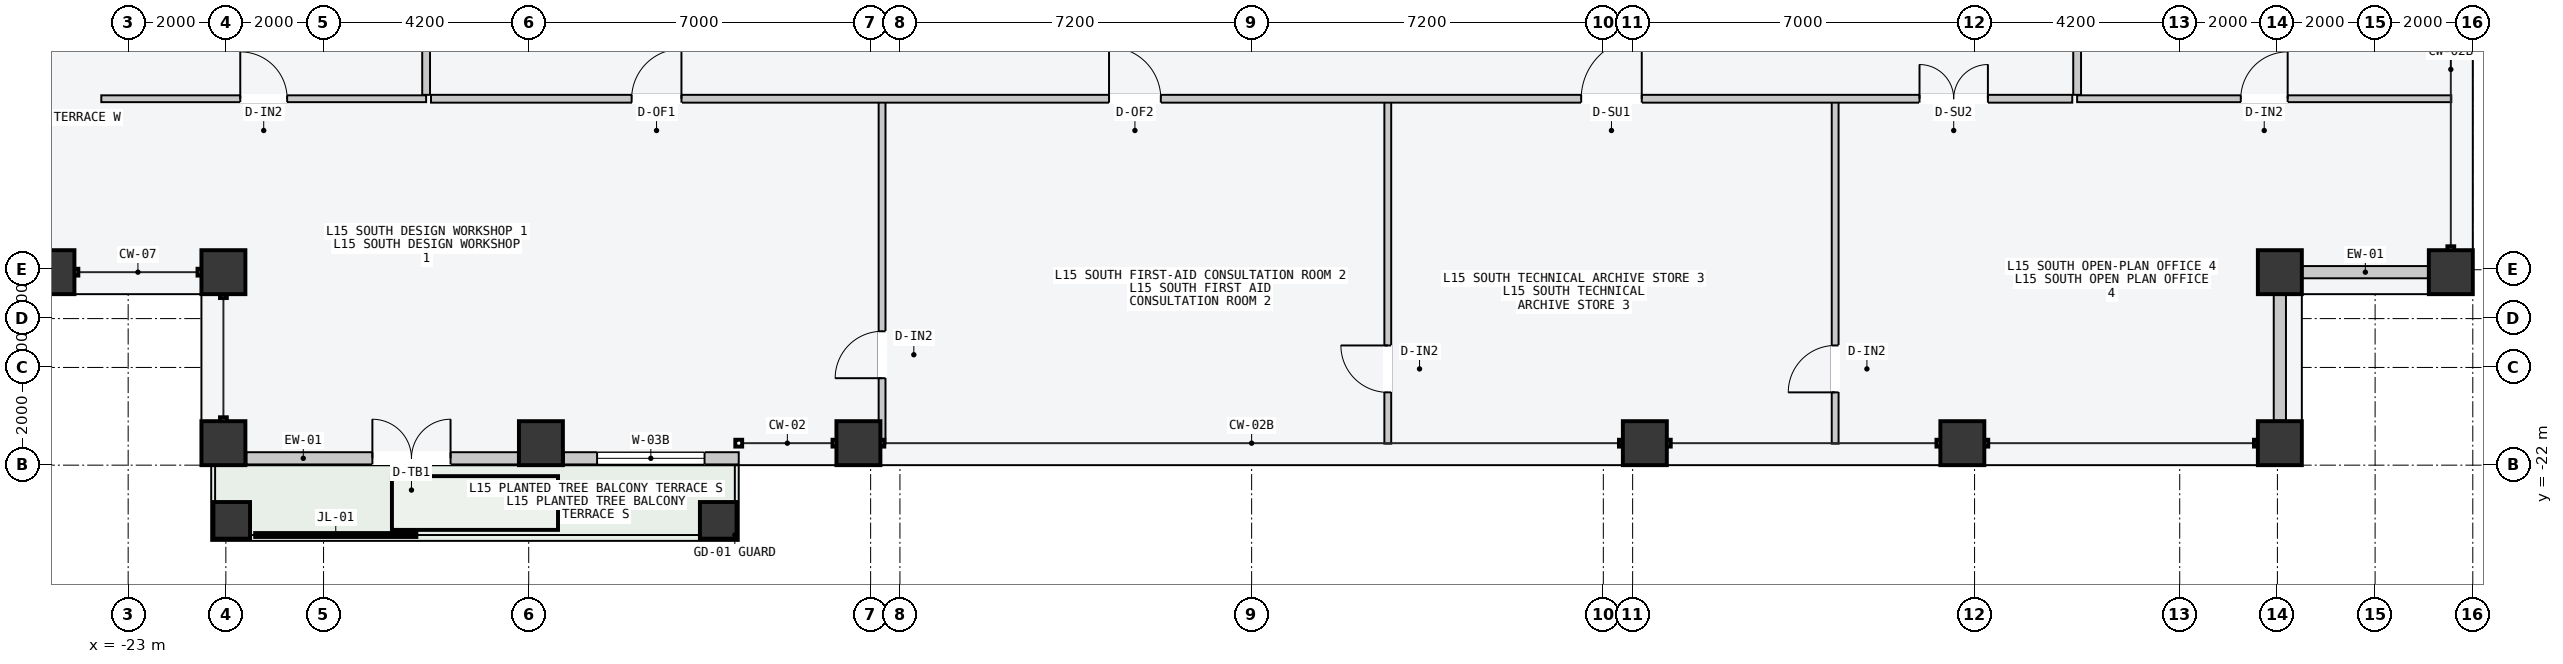
"""IFC4 building model, lengths in metres.
Left out: names, types, materials, properties, quantities, classifications, styles, units other than length and angle.
Written with IfcOpenShell. Run it as: python <this file> out.ifc"""

import sys

from ifc_helpers import new_model, si_unit, direction, frame, frame_2d, origin, origin_2d, place, context, subcontext, project, spatial, rectangle, hollow_rectangle, extrude, element, fill, save


model = new_model("IFC4")
c1 = context("Model", 3, precision=1e-05, world=origin(), true_north=direction((0.0, 1.0)))
c2 = subcontext(c1, "Body", "Model", "MODEL_VIEW")
j1 = project(units=[si_unit("LENGTHUNIT", "METRE"), si_unit("PLANEANGLEUNIT", "RADIAN")], contexts=[c1])
p1 = place(None, origin())
s1 = spatial("IfcSite", under=j1, at=p1, CompositionType="ELEMENT")
p2 = place(p1, origin())
s2 = spatial("IfcBuilding", under=s1, at=p2, CompositionType="ELEMENT")
p3 = place(p2, frame((0.0, 0.0, 60.0)))
s3 = spatial("IfcBuildingStorey", under=s2, at=p3, CompositionType="ELEMENT", Elevation=60.0)
for number, where, z_axis, x_axis in (
    (1, (-21.05, -21.55, 0.0), (0.0, 0.0, 1.0), (1.0, 0.0, 0.0)),
    (2, (-14.55, -21.55, 0.0), (0.0, 0.0, 1.0), (1.0, 0.0, 0.0)),
    (3, (-8.05, -21.55, 0.0), (0.0, 0.0, 1.0), (1.0, 0.0, 0.0)),
    (4, (8.05, -21.55, 0.0), (0.0, 0.0, 1.0), (1.0, 0.0, 0.0)),
    (5, (14.55, -21.55, 0.0), (0.0, 0.0, 1.0), (1.0, 0.0, 0.0)),
    (6, (21.05, -21.55, 0.0), (0.0, 0.0, 1.0), (1.0, 0.0, 0.0)),
    (7, (-24.55, -18.05, 0.0), (0.0, 0.0, 1.0), (0.0, 1.0, 0.0)),
    (8, (24.55, -18.05, 0.0), (0.0, 0.0, 1.0), (0.0, 1.0, 0.0)),
    (9, (21.05, -18.05, 0.0), (0.0, 0.0, 1.0), (1.0, 0.0, 0.0)),
    (10, (-21.05, -18.05, 0.0), (0.0, 0.0, 1.0), (1.0, 0.0, 0.0)),
):
    element("IfcColumn", number, at=place(p3, frame(where, z_axis=z_axis, x_axis=x_axis)), inside=s3, PredefinedType="COLUMN", context=c2, shape_type="SweptSolid", body=[
        extrude(hollow_rectangle(XDim=0.9, YDim=0.9, WallThickness=0.045, at=origin_2d()), origin(), (0.0, 0.0, 1.0), 3.6),
    ])
for number, where, z_axis, x_axis in (
    (11, (-20.88, -23.13, 0.0), (0.0, 0.0, 1.0), (1.0, 0.0, 0.0)),
    (12, (-10.92, -23.13, 0.0), (0.0, 0.0, 1.0), (1.0, 0.0, 0.0)),
):
    element("IfcColumn", number, at=place(p3, frame(where, z_axis=z_axis, x_axis=x_axis)), inside=s3, PredefinedType="COLUMN", context=c2, shape_type="SweptSolid", body=[
        extrude(hollow_rectangle(XDim=0.75, YDim=0.75, WallThickness=0.032, at=origin_2d()), origin(), (0.0, 0.0, 1.0), 3.6),
    ])
p4 = place(p3, frame((-20.58, -21.86, 0.0), z_axis=(0.0, 0.0, 1.0), x_axis=(1.0, 0.0, 0.0)))
e13 = element("IfcWall", 13, at=p4, inside=s3, PredefinedType="STANDARD", context=c2, shape_type="SweptSolid", body=[
    extrude(rectangle(XDim=5.56, YDim=0.25, at=frame_2d((2.78, 0.0))), origin(), (0.0, 0.0, 1.0), 3.4),
])
p5 = place(p4, frame((2.58, 0.0, 0.0)))
e14 = element("IfcOpeningElement", 14, at=p5, cuts=e13, PredefinedType="OPENING", context=c2, shape_type="SweptSolid", body=[
    extrude(rectangle(XDim=1.6, YDim=2.2, at=frame_2d((0.8, 1.1))), frame((0.0, 0.135, 0.0), z_axis=(0.0, -1.0, 0.0), x_axis=(1.0, 0.0, 0.0)), (0.0, 0.0, 1.0), 0.27),
])
p6 = place(p3, frame((-14.08, -21.86, 0.0), z_axis=(0.0, 0.0, 1.0), x_axis=(1.0, 0.0, 0.0)))
e15 = element("IfcWall", 15, at=p6, inside=s3, PredefinedType="STANDARD", context=c2, shape_type="SweptSolid", body=[
    extrude(rectangle(XDim=3.58, YDim=0.25, at=frame_2d((1.79, 0.0))), origin(), (0.0, 0.0, 1.0), 3.4),
])
p7 = place(p6, frame((0.68, 0.0, 0.85)))
e16 = element("IfcOpeningElement", 16, at=p7, cuts=e15, PredefinedType="OPENING", context=c2, shape_type="SweptSolid", body=[
    extrude(rectangle(XDim=2.2, YDim=2.1, at=frame_2d((1.1, 1.05))), frame((0.0, 0.135, 0.0), z_axis=(0.0, -1.0, 0.0), x_axis=(1.0, 0.0, 0.0)), (0.0, 0.0, 1.0), 0.27),
])
for number, where, z_axis, x_axis in (
    (17, (21.51, -18.05, 0.0), (0.0, 0.0, 1.0), (1.0, 0.0, 0.0)),
    (18, (21.05, -21.09, 0.0), (0.0, 0.0, 1.0), (0.0, 1.0, 0.0)),
):
    element("IfcWall", number, at=place(p3, frame(where, z_axis=z_axis, x_axis=x_axis)), inside=s3, PredefinedType="STANDARD", context=c2, shape_type="SweptSolid", body=[
        extrude(rectangle(XDim=2.58, YDim=0.25, at=frame_2d((1.29, 0.0))), origin(), (0.0, 0.0, 1.0), 2.7),
    ])
p8 = place(p3, frame((-7.566, -21.56, 0.0), z_axis=(0.0, 0.0, 1.0), x_axis=(0.0, 1.0, 0.0)))
e19 = element("IfcWall", 19, at=p8, inside=s3, PredefinedType="PARTITIONING", context=c2, shape_type="SweptSolid", body=[
    extrude(rectangle(XDim=7.0, YDim=0.14, at=frame_2d((3.5, 0.0))), origin(), (0.0, 0.0, 1.0), 3.4),
])
p9 = place(p8, frame((1.34, 0.0, 0.0)))
e20 = element("IfcOpeningElement", 20, at=p9, cuts=e19, PredefinedType="OPENING", context=c2, shape_type="SweptSolid", body=[
    extrude(rectangle(XDim=0.96, YDim=2.18, at=frame_2d((0.48, 1.09))), frame((0.0, 0.08, 0.0), z_axis=(0.0, -1.0, 0.0), x_axis=(1.0, 0.0, 0.0)), (0.0, 0.0, 1.0), 0.16),
])
p10 = place(p3, frame((2.787, -21.56, 0.0), z_axis=(0.0, 0.0, 1.0), x_axis=(0.0, 1.0, 0.0)))
e21 = element("IfcWall", 21, at=p10, inside=s3, PredefinedType="PARTITIONING", context=c2, shape_type="SweptSolid", body=[
    extrude(rectangle(XDim=7.0, YDim=0.14, at=frame_2d((3.5, 0.0))), origin(), (0.0, 0.0, 1.0), 3.4),
])
p11 = place(p10, frame((1.05, 0.0, 0.0)))
e22 = element("IfcOpeningElement", 22, at=p11, cuts=e21, PredefinedType="OPENING", context=c2, shape_type="SweptSolid", body=[
    extrude(rectangle(XDim=0.96, YDim=2.18, at=frame_2d((0.48, 1.09))), frame((0.0, 0.08, 0.0), z_axis=(0.0, -1.0, 0.0), x_axis=(1.0, 0.0, 0.0)), (0.0, 0.0, 1.0), 0.16),
])
p12 = place(p3, frame((11.946, -21.56, 0.0), z_axis=(0.0, 0.0, 1.0), x_axis=(0.0, 1.0, 0.0)))
e23 = element("IfcWall", 23, at=p12, inside=s3, PredefinedType="PARTITIONING", context=c2, shape_type="SweptSolid", body=[
    extrude(rectangle(XDim=7.0, YDim=0.14, at=frame_2d((3.5, 0.0))), origin(), (0.0, 0.0, 1.0), 3.4),
])
p13 = place(p12, frame((1.05, 0.0, 0.0)))
e24 = element("IfcOpeningElement", 24, at=p13, cuts=e23, PredefinedType="OPENING", context=c2, shape_type="SweptSolid", body=[
    extrude(rectangle(XDim=0.96, YDim=2.18, at=frame_2d((0.48, 1.09))), frame((0.0, 0.08, 0.0), z_axis=(0.0, -1.0, 0.0), x_axis=(1.0, 0.0, 0.0)), (0.0, 0.0, 1.0), 0.16),
])
p14 = place(p3, frame((-16.8, -14.5, 0.0), z_axis=(0.0, 0.0, 1.0), x_axis=(1.0, 0.0, 0.0)))
e25 = element("IfcWall", 25, at=p14, inside=s3, PredefinedType="PARTITIONING", context=c2, shape_type="SweptSolid", body=[
    extrude(rectangle(XDim=33.6, YDim=0.16, at=frame_2d((16.8, 0.0))), origin(), (0.0, 0.0, 1.0), 3.4),
])
p15 = place(p14, frame((4.107, 0.0, 0.0)))
e26 = element("IfcOpeningElement", 26, at=p15, cuts=e25, PredefinedType="OPENING", context=c2, shape_type="SweptSolid", body=[
    extrude(rectangle(XDim=1.02, YDim=2.2, at=frame_2d((0.51, 1.1))), frame((0.0, 0.09, 0.0), z_axis=(0.0, -1.0, 0.0), x_axis=(1.0, 0.0, 0.0)), (0.0, 0.0, 1.0), 0.18),
])
p16 = place(p14, frame((13.881, 0.0, 0.0)))
e27 = element("IfcOpeningElement", 27, at=p16, cuts=e25, PredefinedType="OPENING", context=c2, shape_type="SweptSolid", body=[
    extrude(rectangle(XDim=1.06, YDim=2.2, at=frame_2d((0.53, 1.1))), frame((0.0, 0.09, 0.0), z_axis=(0.0, -1.0, 0.0), x_axis=(1.0, 0.0, 0.0)), (0.0, 0.0, 1.0), 0.18),
])
p17 = place(p14, frame((23.547, 0.0, 0.0)))
e28 = element("IfcOpeningElement", 28, at=p17, cuts=e25, PredefinedType="OPENING", context=c2, shape_type="SweptSolid", body=[
    extrude(rectangle(XDim=1.24, YDim=2.24, at=frame_2d((0.62, 1.12))), frame((0.0, 0.09, 0.0), z_axis=(0.0, -1.0, 0.0), x_axis=(1.0, 0.0, 0.0)), (0.0, 0.0, 1.0), 0.18),
])
p18 = place(p14, frame((30.473, 0.0, 0.0)))
e29 = element("IfcOpeningElement", 29, at=p18, cuts=e25, PredefinedType="OPENING", context=c2, shape_type="SweptSolid", body=[
    extrude(rectangle(XDim=1.4, YDim=2.2, at=frame_2d((0.7, 1.1))), frame((0.0, 0.09, 0.0), z_axis=(0.0, -1.0, 0.0), x_axis=(1.0, 0.0, 0.0)), (0.0, 0.0, 1.0), 0.18),
])
p19 = place(p3, frame((-23.55, -14.5, 0.0), z_axis=(0.0, 0.0, 1.0), x_axis=(1.0, 0.0, 0.0)))
e30 = element("IfcWall", 30, at=p19, inside=s3, PredefinedType="PARTITIONING", context=c2, shape_type="SweptSolid", body=[
    extrude(rectangle(XDim=6.65, YDim=0.14, at=frame_2d((3.325, 0.0))), origin(), (0.0, 0.0, 1.0), 3.4),
])
p20 = place(p19, frame((2.845, 0.0, 0.0)))
e31 = element("IfcOpeningElement", 31, at=p20, cuts=e30, PredefinedType="OPENING", context=c2, shape_type="SweptSolid", body=[
    extrude(rectangle(XDim=0.96, YDim=2.18, at=frame_2d((0.48, 1.09))), frame((0.0, 0.08, 0.0), z_axis=(0.0, -1.0, 0.0), x_axis=(1.0, 0.0, 0.0)), (0.0, 0.0, 1.0), 0.16),
])
p21 = place(p3, frame((16.9, -14.5, 0.0), z_axis=(0.0, 0.0, 1.0), x_axis=(1.0, 0.0, 0.0)))
e32 = element("IfcWall", 32, at=p21, inside=s3, PredefinedType="PARTITIONING", context=c2, shape_type="SweptSolid", body=[
    extrude(rectangle(XDim=7.66, YDim=0.14, at=frame_2d((3.83, 0.0))), origin(), (0.0, 0.0, 1.0), 3.4),
])
p22 = place(p21, frame((3.35, 0.0, 0.0)))
e33 = element("IfcOpeningElement", 33, at=p22, cuts=e32, PredefinedType="OPENING", context=c2, shape_type="SweptSolid", body=[
    extrude(rectangle(XDim=0.96, YDim=2.18, at=frame_2d((0.48, 1.09))), frame((0.0, 0.08, 0.0), z_axis=(0.0, -1.0, 0.0), x_axis=(1.0, 0.0, 0.0)), (0.0, 0.0, 1.0), 0.16),
])
p23 = place(p3, frame((-16.9, -14.42, 0.0), z_axis=(0.0, 0.0, 1.0), x_axis=(0.0, 1.0, 0.0)))
e34 = element("IfcWall", 34, at=p23, inside=s3, PredefinedType="PARTITIONING", context=c2, shape_type="SweptSolid", body=[
    extrude(rectangle(XDim=26.54, YDim=0.16, at=frame_2d((13.27, 0.0))), origin(), (0.0, 0.0, 1.0), 3.4),
])
p24 = place(p23, frame((5.123, 0.0, 0.0)))
e35 = element("IfcOpeningElement", 35, at=p24, cuts=e34, PredefinedType="OPENING", context=c2, shape_type="SweptSolid", body=[
    extrude(rectangle(XDim=0.9, YDim=2.15, at=frame_2d((0.45, 1.075))), frame((0.0, 0.09, 0.0), z_axis=(0.0, -1.0, 0.0), x_axis=(1.0, 0.0, 0.0)), (0.0, 0.0, 1.0), 0.18),
])
p25 = place(p23, frame((18.363, 0.0, 0.0)))
e36 = element("IfcOpeningElement", 36, at=p25, cuts=e34, PredefinedType="OPENING", context=c2, shape_type="SweptSolid", body=[
    extrude(rectangle(XDim=0.96, YDim=2.18, at=frame_2d((0.48, 1.09))), frame((0.0, 0.09, 0.0), z_axis=(0.0, -1.0, 0.0), x_axis=(1.0, 0.0, 0.0)), (0.0, 0.0, 1.0), 0.18),
])
p26 = place(p3, frame((16.9, -14.42, 0.0), z_axis=(0.0, 0.0, 1.0), x_axis=(0.0, 1.0, 0.0)))
e37 = element("IfcWall", 37, at=p26, inside=s3, PredefinedType="PARTITIONING", context=c2, shape_type="SweptSolid", body=[
    extrude(rectangle(XDim=26.54, YDim=0.16, at=frame_2d((13.27, 0.0))), origin(), (0.0, 0.0, 1.0), 3.4),
])
p27 = place(p26, frame((2.602, 0.0, 0.0)))
e38 = element("IfcOpeningElement", 38, at=p27, cuts=e37, PredefinedType="OPENING", context=c2, shape_type="SweptSolid", body=[
    extrude(rectangle(XDim=0.9, YDim=2.15, at=frame_2d((0.45, 1.075))), frame((0.0, 0.09, 0.0), z_axis=(0.0, -1.0, 0.0), x_axis=(1.0, 0.0, 0.0)), (0.0, 0.0, 1.0), 0.18),
])
p28 = place(p26, frame((10.136, 0.0, 0.0)))
e39 = element("IfcOpeningElement", 39, at=p28, cuts=e37, PredefinedType="OPENING", context=c2, shape_type="SweptSolid", body=[
    extrude(rectangle(XDim=0.96, YDim=2.18, at=frame_2d((0.48, 1.09))), frame((0.0, 0.09, 0.0), z_axis=(0.0, -1.0, 0.0), x_axis=(1.0, 0.0, 0.0)), (0.0, 0.0, 1.0), 0.18),
])
p29 = place(p26, frame((20.324, 0.0, 0.0)))
e40 = element("IfcOpeningElement", 40, at=p29, cuts=e37, PredefinedType="OPENING", context=c2, shape_type="SweptSolid", body=[
    extrude(rectangle(XDim=1.02, YDim=2.2, at=frame_2d((0.51, 1.1))), frame((0.0, 0.09, 0.0), z_axis=(0.0, -1.0, 0.0), x_axis=(1.0, 0.0, 0.0)), (0.0, 0.0, 1.0), 0.18),
])
p30 = place(p5, origin())
e41 = element("IfcDoor", 41, at=p30, inside=s3, OperationType="DOUBLE_DOOR_SINGLE_SWING", PredefinedType="DOOR", context=c2, shape_type="SweptSolid", body=[
    extrude(rectangle(XDim=1.6, YDim=2.2, at=frame_2d((0.8, 1.1))), frame((0.0, 0.025, 0.0), z_axis=(0.0, -1.0, 0.0), x_axis=(1.0, 0.0, 0.0)), (0.0, 0.0, 1.0), 0.05),
])
fill(e14, e41)
p31 = place(p7, origin())
e42 = element("IfcWindow", 42, at=p31, inside=s3, PartitioningType="SINGLE_PANEL", PredefinedType="WINDOW", context=c2, shape_type="SweptSolid", body=[
    extrude(rectangle(XDim=2.2, YDim=2.1, at=frame_2d((1.1, 1.05))), frame((0.0, 0.03, 0.0), z_axis=(0.0, -1.0, 0.0), x_axis=(1.0, 0.0, 0.0)), (0.0, 0.0, 1.0), 0.06),
])
fill(e16, e42)
p32 = place(p9, origin())
e43 = element("IfcDoor", 43, at=p32, inside=s3, OperationType="SINGLE_SWING_LEFT", PredefinedType="DOOR", context=c2, shape_type="SweptSolid", body=[
    extrude(rectangle(XDim=0.96, YDim=2.18, at=frame_2d((0.48, 1.09))), frame((0.0, 0.025, 0.0), z_axis=(0.0, -1.0, 0.0), x_axis=(1.0, 0.0, 0.0)), (0.0, 0.0, 1.0), 0.05),
])
fill(e20, e43)
p33 = place(p11, origin())
e44 = element("IfcDoor", 44, at=p33, inside=s3, OperationType="SINGLE_SWING_RIGHT", PredefinedType="DOOR", context=c2, shape_type="SweptSolid", body=[
    extrude(rectangle(XDim=0.96, YDim=2.18, at=frame_2d((0.48, 1.09))), frame((0.0, 0.025, 0.0), z_axis=(0.0, -1.0, 0.0), x_axis=(1.0, 0.0, 0.0)), (0.0, 0.0, 1.0), 0.05),
])
fill(e22, e44)
p34 = place(p13, origin())
e45 = element("IfcDoor", 45, at=p34, inside=s3, OperationType="SINGLE_SWING_LEFT", PredefinedType="DOOR", context=c2, shape_type="SweptSolid", body=[
    extrude(rectangle(XDim=0.96, YDim=2.18, at=frame_2d((0.48, 1.09))), frame((0.0, 0.025, 0.0), z_axis=(0.0, -1.0, 0.0), x_axis=(1.0, 0.0, 0.0)), (0.0, 0.0, 1.0), 0.05),
])
fill(e24, e45)
p35 = place(p15, origin())
e46 = element("IfcDoor", 46, at=p35, inside=s3, OperationType="SINGLE_SWING_RIGHT", PredefinedType="DOOR", context=c2, shape_type="SweptSolid", body=[
    extrude(rectangle(XDim=1.02, YDim=2.2, at=frame_2d((0.51, 1.1))), frame((0.0, 0.025, 0.0), z_axis=(0.0, -1.0, 0.0), x_axis=(1.0, 0.0, 0.0)), (0.0, 0.0, 1.0), 0.05),
])
fill(e26, e46)
p36 = place(p16, origin())
e47 = element("IfcDoor", 47, at=p36, inside=s3, OperationType="SINGLE_SWING_LEFT", PredefinedType="DOOR", context=c2, shape_type="SweptSolid", body=[
    extrude(rectangle(XDim=1.06, YDim=2.2, at=frame_2d((0.53, 1.1))), frame((0.0, 0.025, 0.0), z_axis=(0.0, -1.0, 0.0), x_axis=(1.0, 0.0, 0.0)), (0.0, 0.0, 1.0), 0.05),
])
fill(e27, e47)
p37 = place(p17, origin())
e48 = element("IfcDoor", 48, at=p37, inside=s3, OperationType="SINGLE_SWING_RIGHT", PredefinedType="DOOR", context=c2, shape_type="SweptSolid", body=[
    extrude(rectangle(XDim=1.24, YDim=2.24, at=frame_2d((0.62, 1.12))), frame((0.0, 0.025, 0.0), z_axis=(0.0, -1.0, 0.0), x_axis=(1.0, 0.0, 0.0)), (0.0, 0.0, 1.0), 0.05),
])
fill(e28, e48)
p38 = place(p18, origin())
e49 = element("IfcDoor", 49, at=p38, inside=s3, OperationType="DOUBLE_DOOR_SINGLE_SWING", PredefinedType="DOOR", context=c2, shape_type="SweptSolid", body=[
    extrude(rectangle(XDim=1.4, YDim=2.2, at=frame_2d((0.7, 1.1))), frame((0.0, 0.025, 0.0), z_axis=(0.0, -1.0, 0.0), x_axis=(1.0, 0.0, 0.0)), (0.0, 0.0, 1.0), 0.05),
])
fill(e29, e49)
p39 = place(p20, origin())
e50 = element("IfcDoor", 50, at=p39, inside=s3, OperationType="SINGLE_SWING_LEFT", PredefinedType="DOOR", context=c2, shape_type="SweptSolid", body=[
    extrude(rectangle(XDim=0.96, YDim=2.18, at=frame_2d((0.48, 1.09))), frame((0.0, 0.025, 0.0), z_axis=(0.0, -1.0, 0.0), x_axis=(1.0, 0.0, 0.0)), (0.0, 0.0, 1.0), 0.05),
])
fill(e31, e50)
p40 = place(p22, origin())
e51 = element("IfcDoor", 51, at=p40, inside=s3, OperationType="SINGLE_SWING_RIGHT", PredefinedType="DOOR", context=c2, shape_type="SweptSolid", body=[
    extrude(rectangle(XDim=0.96, YDim=2.18, at=frame_2d((0.48, 1.09))), frame((0.0, 0.025, 0.0), z_axis=(0.0, -1.0, 0.0), x_axis=(1.0, 0.0, 0.0)), (0.0, 0.0, 1.0), 0.05),
])
fill(e33, e51)
save(model, sys.argv[1])
